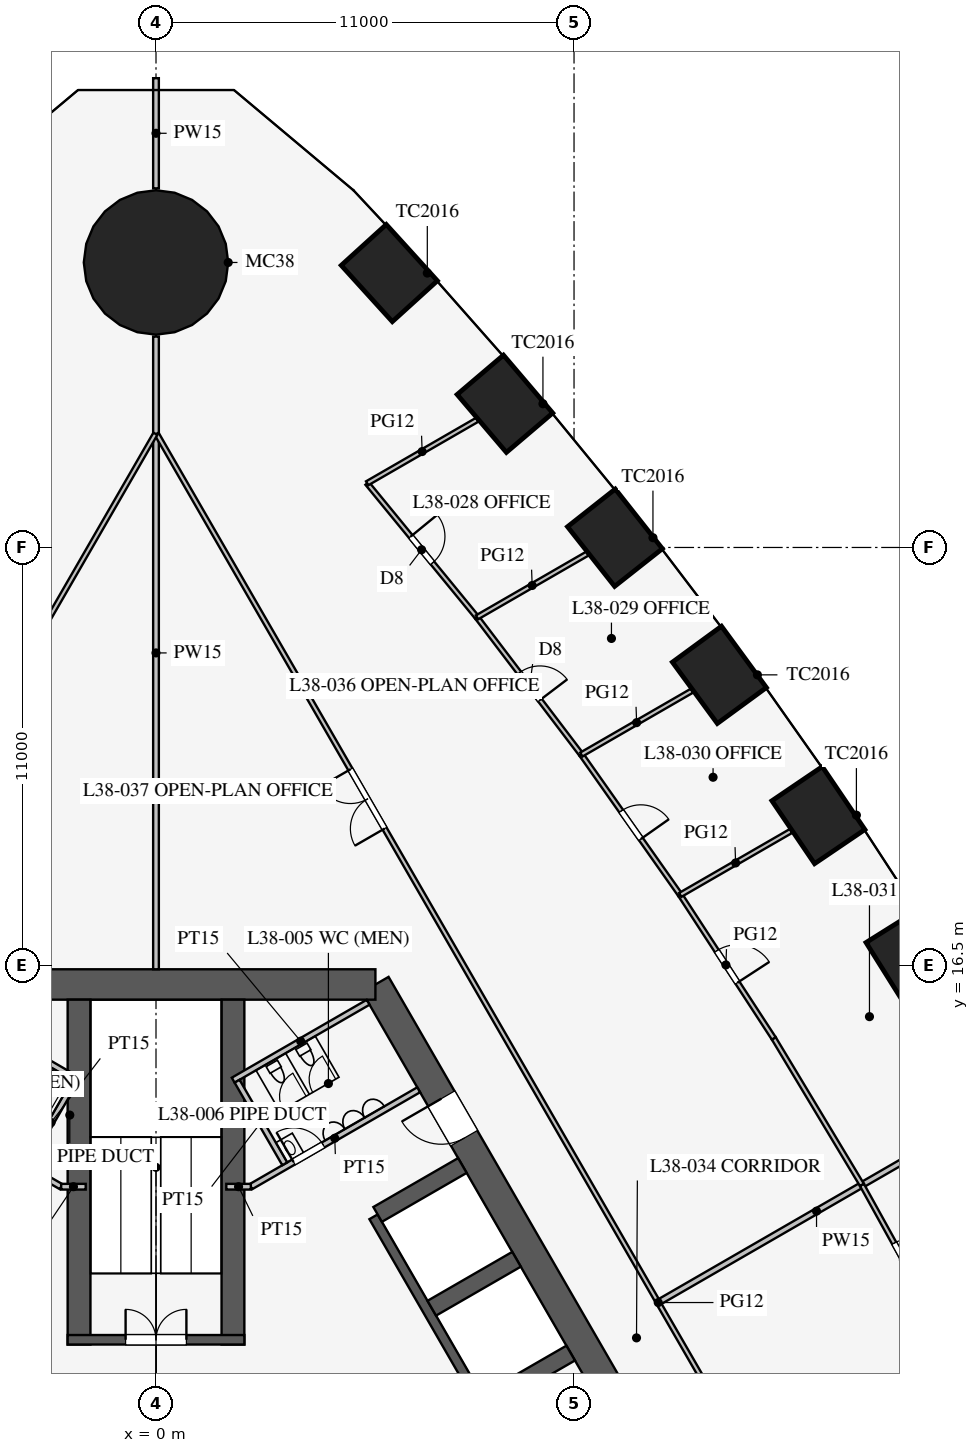
"""IFC4 building model, lengths in metres.
Left out: names, types, materials, properties, quantities, classifications, styles, units other than length and angle.
Written with IfcOpenShell. Run it as: python <this file> out.ifc"""

import sys

from ifc_helpers import new_model, si_unit, direction, frame, frame_2d, origin, origin_2d, place, context, subcontext, project, spatial, rectangle, circle, extrude, element, fill, save


model = new_model("IFC4")
c1 = context("Model", 3, precision=1e-05, world=origin(), true_north=direction((0.0, 1.0)))
c2 = subcontext(c1, "Body", "Model", "MODEL_VIEW")
j1 = project(units=[si_unit("LENGTHUNIT", "METRE"), si_unit("PLANEANGLEUNIT", "RADIAN")], contexts=[c1])
p1 = place(None, origin())
s1 = spatial("IfcSite", under=j1, at=p1, CompositionType="ELEMENT")
p2 = place(p1, origin())
s2 = spatial("IfcBuilding", under=s1, at=p2, CompositionType="ELEMENT")
p3 = place(p2, frame((0.0, 0.0, 166.1)))
s3 = spatial("IfcBuildingStorey", under=s2, at=p3, CompositionType="ELEMENT", Elevation=166.1)
for number, where, z_axis, x_axis in (
    (1, (19.893, 16.681, 0.0), (0.0, 0.0, 1.0), (-0.531, 0.847, 0.0)),
    (2, (17.43, 20.456, 0.0), (0.0, 0.0, 1.0), (-0.561, 0.828, 0.0)),
    (3, (14.825, 24.148, 0.0), (0.0, 0.0, 1.0), (-0.591, 0.807, 0.0)),
    (4, (12.077, 27.757, 0.0), (0.0, 0.0, 1.0), (-0.62, 0.785, 0.0)),
    (5, (9.182, 31.282, 0.0), (0.0, 0.0, 1.0), (-0.648, 0.762, 0.0)),
    (6, (6.139, 34.721, 0.0), (0.0, 0.0, 1.0), (-0.672, 0.74, 0.0)),
):
    element("IfcColumn", number, at=place(p3, frame(where, z_axis=z_axis, x_axis=x_axis)), inside=s3, PredefinedType="COLUMN", context=c2, shape_type="SweptSolid", body=[
        extrude(rectangle(XDim=2.0, YDim=1.6, at=origin_2d()), origin(), (0.0, 0.0, 1.0), 4.2),
    ])
p4 = place(p3, frame((0.0, 35.0, 0.0), z_axis=(0.0, 0.0, 1.0), x_axis=(1.0, 0.0, 0.0)))
e7 = element("IfcColumn", 7, at=p4, inside=s3, PredefinedType="COLUMN", context=c2, shape_type="SweptSolid", body=[
    extrude(circle(Radius=1.9, at=origin_2d()), origin(), (0.0, 0.0, 1.0), 4.2),
])
p5 = place(p3, frame((16.743, -3.0, 0.0), z_axis=(0.0, 0.0, 1.0), x_axis=(-0.500002442456, 0.866023993627, 0.0)))
e8 = element("IfcWall", 8, at=p5, inside=s3, PredefinedType="SHEAR", context=c2, shape_type="SweptSolid", body=[
    extrude(rectangle(XDim=21.939, YDim=0.8, at=frame_2d((10.97, 0.0))), origin(), (0.0, 0.0, 1.0), 4.2),
])
p6 = place(p5, frame((17.27, 0.0, 0.0)))
e9 = element("IfcOpeningElement", 9, at=p6, cuts=e8, PredefinedType="OPENING", context=c2, shape_type="SweptSolid", body=[
    extrude(rectangle(XDim=1.2, YDim=2.1, at=frame_2d((0.6, 1.05))), frame((0.0, 0.41, 0.0), z_axis=(0.0, -1.0, 0.0), x_axis=(1.0, 0.0, 0.0)), (0.0, 0.0, 1.0), 0.82),
])
p7 = place(p5, frame((3.47, 0.0, 0.0)))
e10 = element("IfcOpeningElement", 10, at=p7, cuts=e8, PredefinedType="OPENING", context=c2, shape_type="SweptSolid", body=[
    extrude(rectangle(XDim=1.2, YDim=2.1, at=frame_2d((0.6, 1.05))), frame((0.0, 0.41, 0.0), z_axis=(0.0, -1.0, 0.0), x_axis=(1.0, 0.0, 0.0)), (0.0, 0.0, 1.0), 0.82),
])
p8 = place(p3, frame((5.773, 16.0, 0.0), z_axis=(0.0, 0.0, 1.0), x_axis=(-1.0, 0.0, 0.0)))
e11 = element("IfcWall", 11, at=p8, inside=s3, PredefinedType="SHEAR", context=c2, shape_type="SweptSolid", body=[
    extrude(rectangle(XDim=11.547, YDim=0.8, at=frame_2d((5.773, 0.0))), origin(), (0.0, 0.0, 1.0), 4.2),
])
p9 = place(p3, frame((11.424, 0.014, 0.0), z_axis=(0.0, 0.0, 1.0), x_axis=(-0.500001763848, 0.866024385424, 0.0)))
e12 = element("IfcWall", 12, at=p9, inside=s3, PredefinedType="SHEAR", context=c2, shape_type="SweptSolid", body=[
    extrude(rectangle(XDim=11.4, YDim=0.25, at=frame_2d((5.7, 0.0))), origin(), (0.0, 0.0, 1.0), 4.2),
])
p10 = place(p9, frame((0.975, 0.0, 0.0)))
e13 = element("IfcOpeningElement", 13, at=p10, cuts=e12, PredefinedType="OPENING", context=c2, shape_type="SweptSolid", body=[
    extrude(rectangle(XDim=0.9, YDim=2.1, at=frame_2d((0.45, 1.05))), frame((0.0, 0.135, 0.0), z_axis=(0.0, -1.0, 0.0), x_axis=(1.0, 0.0, 0.0)), (0.0, 0.0, 1.0), 0.27),
])
p11 = place(p9, frame((3.825, 0.0, 0.0)))
e14 = element("IfcOpeningElement", 14, at=p11, cuts=e12, PredefinedType="OPENING", context=c2, shape_type="SweptSolid", body=[
    extrude(rectangle(XDim=0.9, YDim=2.1, at=frame_2d((0.45, 1.05))), frame((0.0, 0.135, 0.0), z_axis=(0.0, -1.0, 0.0), x_axis=(1.0, 0.0, 0.0)), (0.0, 0.0, 1.0), 0.27),
])
for number, where, z_axis, x_axis in (
    (15, (8.682, 5.012, 0.0), (0.0, 0.0, 1.0), (0.866, 0.5, 0.0)),
    (16, (7.257, 7.481, 0.0), (0.0, 0.0, 1.0), (0.866, 0.5, 0.0)),
):
    element("IfcWall", number, at=place(p3, frame(where, z_axis=z_axis, x_axis=x_axis)), inside=s3, PredefinedType="SHEAR", context=c2, shape_type="SweptSolid", body=[
        extrude(rectangle(XDim=2.575, YDim=0.45, at=frame_2d((1.288, 0.0))), origin(), (0.0, 0.0, 1.0), 4.2),
    ])
p12 = place(p3, frame((5.832, 9.949, 0.0), z_axis=(0.0, 0.0, 1.0), x_axis=(0.866029291668, 0.499993265928, 0.0)))
e17 = element("IfcWall", 17, at=p12, inside=s3, PredefinedType="SHEAR", context=c2, shape_type="SweptSolid", body=[
    extrude(rectangle(XDim=2.575, YDim=0.45, at=frame_2d((1.288, 0.0))), origin(), (0.0, 0.0, 1.0), 4.2),
])
for number, where, z_axis, x_axis in (
    (18, (2.025, 6.525, 0.0), (0.0, 0.0, 1.0), (0.0, 1.0, 0.0)),
    (19, (-2.025, 6.525, 0.0), (0.0, 0.0, 1.0), (0.0, 1.0, 0.0)),
):
    element("IfcWall", number, at=place(p3, frame(where, z_axis=z_axis, x_axis=x_axis)), inside=s3, PredefinedType="SHEAR", context=c2, shape_type="SweptSolid", body=[
        extrude(rectangle(XDim=9.075, YDim=0.6, at=frame_2d((4.538, 0.0))), origin(), (0.0, 0.0, 1.0), 4.2),
    ])
p13 = place(p3, frame((2.325, 6.65, 0.0), z_axis=(0.0, 0.0, 1.0), x_axis=(-1.0, 0.0, 0.0)))
e20 = element("IfcWall", 20, at=p13, inside=s3, PredefinedType="SHEAR", context=c2, shape_type="SweptSolid", body=[
    extrude(rectangle(XDim=4.65, YDim=0.25, at=frame_2d((2.325, 0.0))), origin(), (0.0, 0.0, 1.0), 4.2),
])
p14 = place(p13, frame((1.525, 0.0, 0.0)))
e21 = element("IfcOpeningElement", 21, at=p14, cuts=e20, PredefinedType="OPENING", context=c2, shape_type="SweptSolid", body=[
    extrude(rectangle(XDim=1.6, YDim=2.1, at=frame_2d((0.8, 1.05))), frame((0.0, 0.135, 0.0), z_axis=(0.0, -1.0, 0.0), x_axis=(1.0, 0.0, 0.0)), (0.0, 0.0, 1.0), 0.27),
])
p15 = place(p3, frame((2.495, 10.678, 0.0), z_axis=(0.0, 0.0, 1.0), x_axis=(0.86602216432, 0.500005610874, 0.0)))
e22 = element("IfcWall", 22, at=p15, inside=s3, PredefinedType="PARTITIONING", context=c2, shape_type="SweptSolid", body=[
    extrude(rectangle(XDim=5.1, YDim=0.15, at=frame_2d((2.55, 0.0))), origin(), (0.0, 0.0, 1.0), 4.0),
])
p16 = place(p15, frame((1.3, 0.0, 0.0)))
e23 = element("IfcOpeningElement", 23, at=p16, cuts=e22, PredefinedType="OPENING", context=c2, shape_type="SweptSolid", body=[
    extrude(rectangle(XDim=0.9, YDim=2.1, at=frame_2d((0.45, 1.05))), frame((0.0, 0.085, 0.0), z_axis=(0.0, -1.0, 0.0), x_axis=(1.0, 0.0, 0.0)), (0.0, 0.0, 1.0), 0.17),
])
p17 = place(p3, frame((-2.495, 10.678, 0.0), z_axis=(0.0, 0.0, 1.0), x_axis=(-0.86602216432, 0.500005610874, 0.0)))
e24 = element("IfcWall", 24, at=p17, inside=s3, PredefinedType="PARTITIONING", context=c2, shape_type="SweptSolid", body=[
    extrude(rectangle(XDim=5.1, YDim=0.15, at=frame_2d((2.55, 0.0))), origin(), (0.0, 0.0, 1.0), 4.0),
])
p18 = place(p17, frame((2.6, 0.0, 0.0)))
e25 = element("IfcOpeningElement", 25, at=p18, cuts=e24, PredefinedType="OPENING", context=c2, shape_type="SweptSolid", body=[
    extrude(rectangle(XDim=0.9, YDim=2.1, at=frame_2d((0.45, 1.05))), frame((0.0, 0.085, 0.0), z_axis=(0.0, -1.0, 0.0), x_axis=(1.0, 0.0, 0.0)), (0.0, 0.0, 1.0), 0.17),
])
for number, where, z_axis, x_axis in (
    (26, (2.495, 10.678, 0.0), (0.0, 0.0, 1.0), (-1.0, 0.0, 0.0)),
    (27, (-2.495, 10.678, 0.0), (0.0, 0.0, 1.0), (1.0, 0.0, 0.0)),
):
    element("IfcWall", number, at=place(p3, frame(where, z_axis=z_axis, x_axis=x_axis)), inside=s3, PredefinedType="PARTITIONING", context=c2, shape_type="SweptSolid", body=[
        extrude(rectangle(XDim=0.645, YDim=0.15, at=frame_2d((0.323, 0.0))), origin(), (0.0, 0.0, 1.0), 4.0),
    ])
p19 = place(p3, frame((2.031, 13.482, 0.0), z_axis=(0.0, 0.0, 1.0), x_axis=(0.866050731258, 0.499956128963, 0.0)))
e28 = element("IfcWall", 28, at=p19, inside=s3, PredefinedType="PARTITIONING", context=c2, shape_type="SweptSolid", body=[
    extrude(rectangle(XDim=4.1, YDim=0.15, at=frame_2d((2.05, 0.0))), origin(), (0.0, 0.0, 1.0), 4.0),
])
p20 = place(p3, frame((3.389, 11.281, 0.0), z_axis=(0.0, 0.0, 1.0), x_axis=(-0.499989096993, 0.866031698547, 0.0)))
e29 = element("IfcWall", 29, at=p20, inside=s3, PredefinedType="PARTITIONING", context=c2, shape_type="SweptSolid", body=[
    extrude(rectangle(XDim=2.51, YDim=0.15, at=frame_2d((1.255, 0.0))), origin(), (0.0, 0.0, 1.0), 4.0),
])
p21 = place(p3, frame((-2.031, 13.482, 0.0), z_axis=(0.0, 0.0, 1.0), x_axis=(-0.866050731258, 0.499956128963, 0.0)))
e30 = element("IfcWall", 30, at=p21, inside=s3, PredefinedType="PARTITIONING", context=c2, shape_type="SweptSolid", body=[
    extrude(rectangle(XDim=4.1, YDim=0.15, at=frame_2d((2.05, 0.0))), origin(), (0.0, 0.0, 1.0), 4.0),
])
p22 = place(p3, frame((-3.389, 11.281, 0.0), z_axis=(0.0, 0.0, 1.0), x_axis=(0.499989096993, 0.866031698547, 0.0)))
e31 = element("IfcWall", 31, at=p22, inside=s3, PredefinedType="PARTITIONING", context=c2, shape_type="SweptSolid", body=[
    extrude(rectangle(XDim=2.51, YDim=0.15, at=frame_2d((1.255, 0.0))), origin(), (0.0, 0.0, 1.0), 4.0),
])
p23 = place(p3, frame((0.0, 16.4, 0.0), z_axis=(0.0, 0.0, 1.0), x_axis=(0.0, 1.0, 0.0)))
e32 = element("IfcWall", 32, at=p23, inside=s3, PredefinedType="PARTITIONING", context=c2, shape_type="SweptSolid", body=[
    extrude(rectangle(XDim=16.65, YDim=0.15, at=frame_2d((8.325, 0.0))), origin(), (0.0, 0.0, 1.0), 2.3),
])
p24 = place(p3, frame((0.0, 36.95, 0.0), z_axis=(0.0, 0.0, 1.0), x_axis=(0.0, 1.0, 0.0)))
e33 = element("IfcWall", 33, at=p24, inside=s3, PredefinedType="PARTITIONING", context=c2, shape_type="SweptSolid", body=[
    extrude(rectangle(XDim=2.899, YDim=0.15, at=frame_2d((1.45, 0.0))), origin(), (0.0, 0.0, 1.0), 2.3),
])
p25 = place(p3, frame((13.268, 7.66, 0.0), z_axis=(0.0, 0.0, 1.0), x_axis=(0.866013963754, 0.500019814191, 0.0)))
e34 = element("IfcWall", 34, at=p25, inside=s3, PredefinedType="PARTITIONING", context=c2, shape_type="SweptSolid", body=[
    extrude(rectangle(XDim=9.5, YDim=0.15, at=frame_2d((4.75, 0.0))), origin(), (0.0, 0.0, 1.0), 2.8),
])
p26 = place(p3, frame((26.415, -15.231, 0.0), z_axis=(0.0, 0.0, 1.0), x_axis=(-0.50000091641, 0.866024874695, 0.0)))
e35 = element("IfcWall", 35, at=p26, inside=s3, PredefinedType="PARTITIONING", context=c2, shape_type="SweptSolid", body=[
    extrude(rectangle(XDim=52.796, YDim=0.12, at=frame_2d((26.398, 0.0))), origin(), (0.0, 0.0, 1.0), 2.9),
])
p27 = place(p26, frame((10.2, 0.0, 0.15)))
e36 = element("IfcOpeningElement", 36, at=p27, cuts=e35, PredefinedType="OPENING", context=c2, shape_type="SweptSolid", body=[
    extrude(rectangle(XDim=1.8, YDim=2.1, at=frame_2d((0.9, 1.05))), frame((0.0, 0.07, 0.0), z_axis=(0.0, -1.0, 0.0), x_axis=(1.0, 0.0, 0.0)), (0.0, 0.0, 1.0), 0.14),
])
p28 = place(p26, frame((40.8, 0.0, 0.15)))
e37 = element("IfcOpeningElement", 37, at=p28, cuts=e35, PredefinedType="OPENING", context=c2, shape_type="SweptSolid", body=[
    extrude(rectangle(XDim=1.8, YDim=2.1, at=frame_2d((0.9, 1.05))), frame((0.0, 0.07, 0.0), z_axis=(0.0, -1.0, 0.0), x_axis=(1.0, 0.0, 0.0)), (0.0, 0.0, 1.0), 0.14),
])
p29 = place(p3, frame((18.576, 10.725, 0.0), z_axis=(0.0, 0.0, 1.0), x_axis=(-0.515548366618, 0.856860479703, 0.0)))
e38 = element("IfcWall", 38, at=p29, inside=s3, PredefinedType="PARTITIONING", context=c2, shape_type="SweptSolid", body=[
    extrude(rectangle(XDim=4.501, YDim=0.12, at=frame_2d((2.25, 0.0))), origin(), (0.0, 0.0, 1.0), 2.9),
])
p30 = place(p3, frame((11.192, 22.05, 0.0), z_axis=(0.0, 0.0, 1.0), x_axis=(-0.605274299339, 0.796016973789, 0.0)))
e39 = element("IfcWall", 39, at=p30, inside=s3, PredefinedType="PARTITIONING", context=c2, shape_type="SweptSolid", body=[
    extrude(rectangle(XDim=4.536, YDim=0.12, at=frame_2d((2.268, 0.0))), origin(), (0.0, 0.0, 1.0), 2.9),
])
p31 = place(p30, frame((1.8, 0.0, 0.15)))
e40 = element("IfcOpeningElement", 40, at=p31, cuts=e39, PredefinedType="OPENING", context=c2, shape_type="SweptSolid", body=[
    extrude(rectangle(XDim=0.9, YDim=2.1, at=frame_2d((0.45, 1.05))), frame((0.0, 0.07, 0.0), z_axis=(0.0, -1.0, 0.0), x_axis=(1.0, 0.0, 0.0)), (0.0, 0.0, 1.0), 0.14),
])
p32 = place(p3, frame((8.447, 25.661, 0.0), z_axis=(0.0, 0.0, 1.0), x_axis=(-0.633843962561, 0.773460943503, 0.0)))
e41 = element("IfcWall", 41, at=p32, inside=s3, PredefinedType="PARTITIONING", context=c2, shape_type="SweptSolid", body=[
    extrude(rectangle(XDim=4.561, YDim=0.12, at=frame_2d((2.28, 0.0))), origin(), (0.0, 0.0, 1.0), 2.9),
])
p33 = place(p32, frame((1.85, 0.0, 0.15)))
e42 = element("IfcOpeningElement", 42, at=p33, cuts=e41, PredefinedType="OPENING", context=c2, shape_type="SweptSolid", body=[
    extrude(rectangle(XDim=0.9, YDim=2.1, at=frame_2d((0.45, 1.05))), frame((0.0, 0.07, 0.0), z_axis=(0.0, -1.0, 0.0), x_axis=(1.0, 0.0, 0.0)), (0.0, 0.0, 1.0), 0.14),
])
p34 = place(p3, frame((16.256, 14.581, 0.0), z_axis=(0.0, 0.0, 1.0), x_axis=(-0.546069464151, 0.837739900161, 0.0)))
e43 = element("IfcWall", 43, at=p34, inside=s3, PredefinedType="PARTITIONING", context=c2, shape_type="SweptSolid", body=[
    extrude(rectangle(XDim=4.507, YDim=0.12, at=frame_2d((2.253, 0.0))), origin(), (0.0, 0.0, 1.0), 2.9),
])
p35 = place(p34, frame((1.75, 0.0, 0.15)))
e44 = element("IfcOpeningElement", 44, at=p35, cuts=e43, PredefinedType="OPENING", context=c2, shape_type="SweptSolid", body=[
    extrude(rectangle(XDim=1.0, YDim=2.1, at=frame_2d((0.5, 1.05))), frame((0.0, 0.07, 0.0), z_axis=(0.0, -1.0, 0.0), x_axis=(1.0, 0.0, 0.0)), (0.0, 0.0, 1.0), 0.14),
])
p36 = place(p3, frame((13.795, 18.357, 0.0), z_axis=(0.0, 0.0, 1.0), x_axis=(-0.575987178736, 0.817458726745, 0.0)))
e45 = element("IfcWall", 45, at=p36, inside=s3, PredefinedType="PARTITIONING", context=c2, shape_type="SweptSolid", body=[
    extrude(rectangle(XDim=4.518, YDim=0.12, at=frame_2d((2.259, 0.0))), origin(), (0.0, 0.0, 1.0), 2.9),
])
p37 = place(p36, frame((1.8, 0.0, 0.15)))
e46 = element("IfcOpeningElement", 46, at=p37, cuts=e45, PredefinedType="OPENING", context=c2, shape_type="SweptSolid", body=[
    extrude(rectangle(XDim=0.9, YDim=2.1, at=frame_2d((0.45, 1.05))), frame((0.0, 0.07, 0.0), z_axis=(0.0, -1.0, 0.0), x_axis=(1.0, 0.0, 0.0)), (0.0, 0.0, 1.0), 0.14),
])
p38 = place(p3, frame((20.756, 6.787, 0.0), z_axis=(0.0, 0.0, 1.0), x_axis=(-0.484292898211, 0.874905931368, 0.0)))
e47 = element("IfcWall", 47, at=p38, inside=s3, PredefinedType="PARTITIONING", context=c2, shape_type="SweptSolid", body=[
    extrude(rectangle(XDim=4.501, YDim=0.12, at=frame_2d((2.25, 0.0))), origin(), (0.0, 0.0, 1.0), 2.9),
])
p39 = place(p38, frame((1.75, 0.0, 0.15)))
e48 = element("IfcOpeningElement", 48, at=p39, cuts=e47, PredefinedType="OPENING", context=c2, shape_type="SweptSolid", body=[
    extrude(rectangle(XDim=1.0, YDim=2.1, at=frame_2d((0.5, 1.05))), frame((0.0, 0.07, 0.0), z_axis=(0.0, -1.0, 0.0), x_axis=(1.0, 0.0, 0.0)), (0.0, 0.0, 1.0), 0.14),
])
p40 = place(p3, frame((11.192, 22.05, 0.0), z_axis=(0.0, 0.0, 1.0), x_axis=(0.866025882247, 0.499999171277, 0.0)))
e49 = element("IfcWall", 49, at=p40, inside=s3, PredefinedType="PARTITIONING", context=c2, shape_type="SweptSolid", body=[
    extrude(rectangle(XDim=3.36, YDim=0.12, at=frame_2d((1.68, 0.0))), origin(), (0.0, 0.0, 1.0), 2.6),
])
p41 = place(p3, frame((8.447, 25.661, 0.0), z_axis=(0.0, 0.0, 1.0), x_axis=(0.866025533106, 0.499999776008, 0.0)))
e50 = element("IfcWall", 50, at=p41, inside=s3, PredefinedType="PARTITIONING", context=c2, shape_type="SweptSolid", body=[
    extrude(rectangle(XDim=3.353, YDim=0.12, at=frame_2d((1.677, 0.0))), origin(), (0.0, 0.0, 1.0), 2.8),
])
p42 = place(p3, frame((5.556, 29.188, 0.0), z_axis=(0.0, 0.0, 1.0), x_axis=(0.866018979599, 0.50001112685, 0.0)))
e51 = element("IfcWall", 51, at=p42, inside=s3, PredefinedType="PARTITIONING", context=c2, shape_type="SweptSolid", body=[
    extrude(rectangle(XDim=3.343, YDim=0.12, at=frame_2d((1.672, 0.0))), origin(), (0.0, 0.0, 1.0), 2.9),
])
p43 = place(p3, frame((13.795, 18.357, 0.0), z_axis=(0.0, 0.0, 1.0), x_axis=(0.866024928363, 0.500000823453, 0.0)))
e52 = element("IfcWall", 52, at=p43, inside=s3, PredefinedType="PARTITIONING", context=c2, shape_type="SweptSolid", body=[
    extrude(rectangle(XDim=3.366, YDim=0.12, at=frame_2d((1.683, 0.0))), origin(), (0.0, 0.0, 1.0), 2.9),
])
p44 = place(p3, frame((-0.016, 30.491, 0.0), z_axis=(0.0, 0.0, 1.0), x_axis=(-0.50000091641, -0.866024874695, 0.0)))
e53 = element("IfcWall", 53, at=p44, inside=s3, PredefinedType="PARTITIONING", context=c2, shape_type="SweptSolid", body=[
    extrude(rectangle(XDim=52.796, YDim=0.12, at=frame_2d((26.398, 0.0))), origin(), (0.0, 0.0, 1.0), 2.9),
])
p45 = place(p44, frame((10.2, 0.0, 0.15)))
e54 = element("IfcOpeningElement", 54, at=p45, cuts=e53, PredefinedType="OPENING", context=c2, shape_type="SweptSolid", body=[
    extrude(rectangle(XDim=1.8, YDim=2.1, at=frame_2d((0.9, 1.05))), frame((0.0, 0.07, 0.0), z_axis=(0.0, -1.0, 0.0), x_axis=(1.0, 0.0, 0.0)), (0.0, 0.0, 1.0), 0.14),
])
p46 = place(p44, frame((40.8, 0.0, 0.15)))
e55 = element("IfcOpeningElement", 55, at=p46, cuts=e53, PredefinedType="OPENING", context=c2, shape_type="SweptSolid", body=[
    extrude(rectangle(XDim=1.8, YDim=2.1, at=frame_2d((0.9, 1.05))), frame((0.0, 0.07, 0.0), z_axis=(0.0, -1.0, 0.0), x_axis=(1.0, 0.0, 0.0)), (0.0, 0.0, 1.0), 0.14),
])
p47 = place(p16, origin())
e56 = element("IfcDoor", 56, at=p47, inside=s3, OperationType="SINGLE_SWING_LEFT", PredefinedType="DOOR", context=c2, shape_type="SweptSolid", body=[
    extrude(rectangle(XDim=0.9, YDim=2.1, at=frame_2d((0.45, 1.05))), frame((0.0, 0.025, 0.0), z_axis=(0.0, -1.0, 0.0), x_axis=(1.0, 0.0, 0.0)), (0.0, 0.0, 1.0), 0.05),
])
fill(e23, e56)
p48 = place(p14, frame((1.6, 0.0, 0.0), z_axis=(0.0, 0.0, 1.0), x_axis=(-1.0, 0.0, 0.0)))
e57 = element("IfcDoor", 57, at=p48, inside=s3, OperationType="DOUBLE_DOOR_SINGLE_SWING", PredefinedType="DOOR", context=c2, shape_type="SweptSolid", body=[
    extrude(rectangle(XDim=1.6, YDim=2.1, at=frame_2d((0.8, 1.05))), frame((0.0, 0.025, 0.0), z_axis=(0.0, -1.0, 0.0), x_axis=(1.0, 0.0, 0.0)), (0.0, 0.0, 1.0), 0.05),
])
fill(e21, e57)
p49 = place(p6, origin())
e58 = element("IfcDoor", 58, at=p49, inside=s3, OperationType="SINGLE_SWING_RIGHT", PredefinedType="DOOR", context=c2, shape_type="SweptSolid", body=[
    extrude(rectangle(XDim=1.2, YDim=2.1, at=frame_2d((0.6, 1.05))), frame((0.0, 0.025, 0.0), z_axis=(0.0, -1.0, 0.0), x_axis=(1.0, 0.0, 0.0)), (0.0, 0.0, 1.0), 0.05),
])
fill(e9, e58)
p50 = place(p33, frame((0.9, 0.0, 0.0), z_axis=(0.0, 0.0, 1.0), x_axis=(-1.0, 0.0, 0.0)))
e59 = element("IfcDoor", 59, at=p50, inside=s3, OperationType="SINGLE_SWING_LEFT", PredefinedType="DOOR", context=c2, shape_type="SweptSolid", body=[
    extrude(rectangle(XDim=0.9, YDim=2.1, at=frame_2d((0.45, 1.05))), frame((0.0, 0.025, 0.0), z_axis=(0.0, -1.0, 0.0), x_axis=(1.0, 0.0, 0.0)), (0.0, 0.0, 1.0), 0.05),
])
fill(e42, e59)
p51 = place(p31, frame((0.9, 0.0, 0.0), z_axis=(0.0, 0.0, 1.0), x_axis=(-1.0, 0.0, 0.0)))
e60 = element("IfcDoor", 60, at=p51, inside=s3, OperationType="SINGLE_SWING_RIGHT", PredefinedType="DOOR", context=c2, shape_type="SweptSolid", body=[
    extrude(rectangle(XDim=0.9, YDim=2.1, at=frame_2d((0.45, 1.05))), frame((0.0, 0.025, 0.0), z_axis=(0.0, -1.0, 0.0), x_axis=(1.0, 0.0, 0.0)), (0.0, 0.0, 1.0), 0.05),
])
fill(e40, e60)
p52 = place(p37, frame((0.9, 0.0, 0.0), z_axis=(0.0, 0.0, 1.0), x_axis=(-1.0, 0.0, 0.0)))
e61 = element("IfcDoor", 61, at=p52, inside=s3, OperationType="SINGLE_SWING_RIGHT", PredefinedType="DOOR", context=c2, shape_type="SweptSolid", body=[
    extrude(rectangle(XDim=0.9, YDim=2.1, at=frame_2d((0.45, 1.05))), frame((0.0, 0.025, 0.0), z_axis=(0.0, -1.0, 0.0), x_axis=(1.0, 0.0, 0.0)), (0.0, 0.0, 1.0), 0.05),
])
fill(e46, e61)
p53 = place(p35, frame((1.0, 0.0, 0.0), z_axis=(0.0, 0.0, 1.0), x_axis=(-1.0, 0.0, 0.0)))
e62 = element("IfcDoor", 62, at=p53, inside=s3, OperationType="SINGLE_SWING_RIGHT", PredefinedType="DOOR", context=c2, shape_type="SweptSolid", body=[
    extrude(rectangle(XDim=1.0, YDim=2.1, at=frame_2d((0.5, 1.05))), frame((0.0, 0.025, 0.0), z_axis=(0.0, -1.0, 0.0), x_axis=(1.0, 0.0, 0.0)), (0.0, 0.0, 1.0), 0.05),
])
fill(e44, e62)
p54 = place(p39, frame((1.0, 0.0, 0.0), z_axis=(0.0, 0.0, 1.0), x_axis=(-1.0, 0.0, 0.0)))
e63 = element("IfcDoor", 63, at=p54, inside=s3, OperationType="SINGLE_SWING_RIGHT", PredefinedType="DOOR", context=c2, shape_type="SweptSolid", body=[
    extrude(rectangle(XDim=1.0, YDim=2.1, at=frame_2d((0.5, 1.05))), frame((0.0, 0.025, 0.0), z_axis=(0.0, -1.0, 0.0), x_axis=(1.0, 0.0, 0.0)), (0.0, 0.0, 1.0), 0.05),
])
fill(e48, e63)
p55 = place(p28, origin())
e64 = element("IfcDoor", 64, at=p55, inside=s3, OperationType="DOUBLE_DOOR_SINGLE_SWING", PredefinedType="DOOR", context=c2, shape_type="SweptSolid", body=[
    extrude(rectangle(XDim=1.8, YDim=2.1, at=frame_2d((0.9, 1.05))), frame((0.0, 0.025, 0.0), z_axis=(0.0, -1.0, 0.0), x_axis=(1.0, 0.0, 0.0)), (0.0, 0.0, 1.0), 0.05),
])
fill(e37, e64)
save(model, sys.argv[1])
